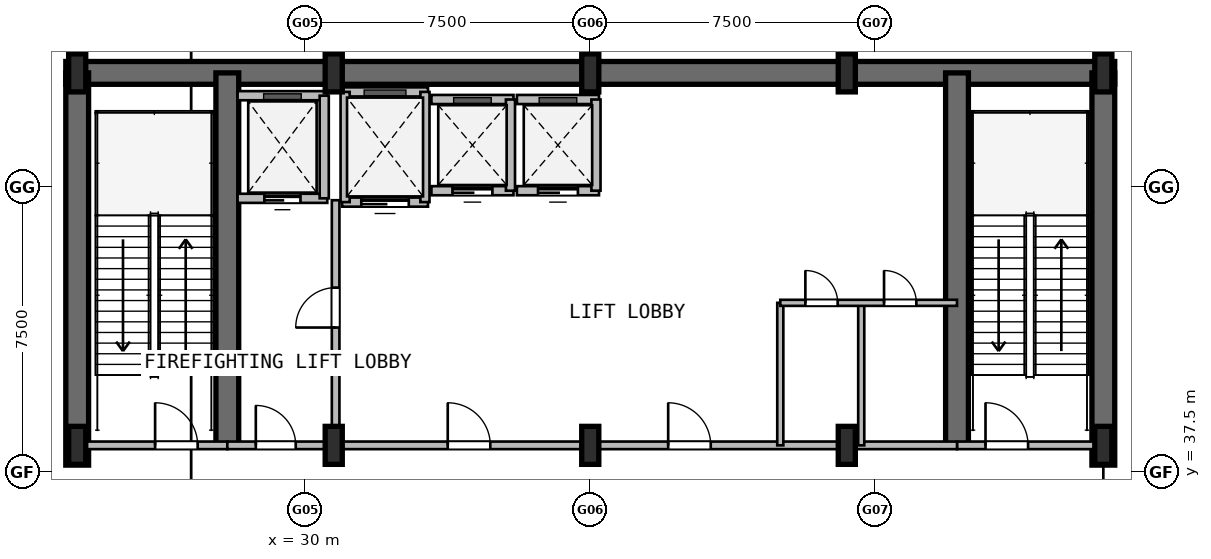
"""IFC4 building model, lengths in metres.
Left out: names, types, materials, properties, quantities, classifications, styles, units other than length and angle.
Written with IfcOpenShell. Run it as: python <this file> out.ifc"""

import sys

from ifc_helpers import new_model, si_unit, direction, frame, frame_2d, origin, origin_2d, place, context, subcontext, project, spatial, rectangle, i_section, extrude, element, fill, save


model = new_model("IFC4")
c1 = context("Model", 3, precision=1e-05, world=origin(), true_north=direction((0.0, 1.0)))
c2 = subcontext(c1, "Body", "Model", "MODEL_VIEW")
j1 = project(units=[si_unit("LENGTHUNIT", "METRE"), si_unit("PLANEANGLEUNIT", "RADIAN")], contexts=[c1])
p1 = place(None, origin())
s1 = spatial("IfcSite", under=j1, at=p1, CompositionType="ELEMENT")
p2 = place(p1, origin())
s2 = spatial("IfcBuilding", under=s1, at=p2, CompositionType="ELEMENT")
p3 = place(p2, frame((0.0, 0.0, -10.8)))
s3 = spatial("IfcBuildingStorey", under=s2, at=p3, CompositionType="ELEMENT", Elevation=-10.8)
p4 = place(p3, frame((23.7, 48.0, 0.0), z_axis=(0.0, 0.0, 1.0), x_axis=(1.0, 0.0, 0.0)))
e1 = element("IfcWall", 1, at=p4, inside=s3, PredefinedType="SHEAR", context=c2, shape_type="SweptSolid", body=[
    extrude(rectangle(XDim=27.6, YDim=0.6, at=frame_2d((13.8, 0.0))), origin(), (0.0, 0.0, 1.0), 5.4),
])
for number, where, z_axis, x_axis in (
    (2, (24.0, 37.68, 0.0), (0.0, 0.0, 1.0), (0.0, 1.0, 0.0)),
    (3, (51.0, 37.68, 0.0), (0.0, 0.0, 1.0), (0.0, 1.0, 0.0)),
):
    element("IfcWall", number, at=place(p3, frame(where, z_axis=z_axis, x_axis=x_axis)), inside=s3, PredefinedType="SHEAR", context=c2, shape_type="SweptSolid", body=[
        extrude(rectangle(XDim=10.32, YDim=0.6, at=frame_2d((5.16, 0.0))), origin(), (0.0, 0.0, 1.0), 5.4),
    ])
for number, where, z_axis, x_axis in (
    (4, (27.95, 38.2, 0.0), (0.0, 0.0, 1.0), (0.0, 1.0, 0.0)),
    (5, (47.15, 38.2, 0.0), (0.0, 0.0, 1.0), (0.0, 1.0, 0.0)),
):
    element("IfcWall", number, at=place(p3, frame(where, z_axis=z_axis, x_axis=x_axis)), inside=s3, PredefinedType="SHEAR", context=c2, shape_type="SweptSolid", body=[
        extrude(rectangle(XDim=9.8, YDim=0.6, at=frame_2d((4.9, 0.0))), origin(), (0.0, 0.0, 1.0), 5.4),
    ])
for number, where, z_axis, x_axis in (
    (6, (24.0, 38.2, 0.0), (0.0, 0.0, 1.0), (1.0, 0.0, 0.0)),
    (7, (24.0, 48.0, 0.0), (0.0, 0.0, 1.0), (1.0, 0.0, 0.0)),
    (8, (30.75, 38.2, 0.0), (0.0, 0.0, 1.0), (1.0, 0.0, 0.0)),
    (9, (30.75, 48.0, 0.0), (0.0, 0.0, 1.0), (1.0, 0.0, 0.0)),
    (10, (37.5, 38.2, 0.0), (0.0, 0.0, 1.0), (1.0, 0.0, 0.0)),
    (11, (37.5, 48.0, 0.0), (0.0, 0.0, 1.0), (1.0, 0.0, 0.0)),
    (12, (44.25, 38.2, 0.0), (0.0, 0.0, 1.0), (1.0, 0.0, 0.0)),
    (13, (44.25, 48.0, 0.0), (0.0, 0.0, 1.0), (1.0, 0.0, 0.0)),
    (14, (51.0, 38.2, 0.0), (0.0, 0.0, 1.0), (1.0, 0.0, 0.0)),
    (15, (51.0, 48.0, 0.0), (0.0, 0.0, 1.0), (1.0, 0.0, 0.0)),
):
    element("IfcColumn", number, at=place(p3, frame(where, z_axis=z_axis, x_axis=x_axis)), inside=s3, PredefinedType="COLUMN", context=c2, shape_type="SweptSolid", body=[
        extrude(i_section(OverallWidth=0.45, OverallDepth=1.0, WebThickness=0.022, FlangeThickness=0.04, at=origin_2d()), origin(), (0.0, 0.0, 1.0), 5.4),
    ])
p5 = place(p3, frame((24.0, 38.2, 0.0), z_axis=(0.0, 0.0, 1.0), x_axis=(1.0, 0.0, 0.0)))
e16 = element("IfcWall", 16, at=p5, inside=s3, PredefinedType="PARTITIONING", context=c2, shape_type="SweptSolid", body=[
    extrude(rectangle(XDim=3.95, YDim=0.2, at=frame_2d((1.975, 0.0))), origin(), (0.0, 0.0, 1.0), 4.28),
])
p6 = place(p5, frame((2.05, 0.0, 0.0)))
e17 = element("IfcOpeningElement", 17, at=p6, cuts=e16, PredefinedType="OPENING", context=c2, shape_type="SweptSolid", body=[
    extrude(rectangle(XDim=1.12, YDim=2.1, at=frame_2d((0.56, 1.05))), frame((0.0, 0.11, 0.0), z_axis=(0.0, -1.0, 0.0), x_axis=(1.0, 0.0, 0.0)), (0.0, 0.0, 1.0), 0.22),
])
p7 = place(p3, frame((47.15, 38.2, 0.0), z_axis=(0.0, 0.0, 1.0), x_axis=(1.0, 0.0, 0.0)))
e18 = element("IfcWall", 18, at=p7, inside=s3, PredefinedType="PARTITIONING", context=c2, shape_type="SweptSolid", body=[
    extrude(rectangle(XDim=3.85, YDim=0.2, at=frame_2d((1.925, 0.0))), origin(), (0.0, 0.0, 1.0), 4.28),
])
p8 = place(p7, frame((0.75, 0.0, 0.0)))
e19 = element("IfcOpeningElement", 19, at=p8, cuts=e18, PredefinedType="OPENING", context=c2, shape_type="SweptSolid", body=[
    extrude(rectangle(XDim=1.12, YDim=2.1, at=frame_2d((0.56, 1.05))), frame((0.0, 0.11, 0.0), z_axis=(0.0, -1.0, 0.0), x_axis=(1.0, 0.0, 0.0)), (0.0, 0.0, 1.0), 0.22),
])
p9 = place(p3, frame((30.8, 38.2, 0.0), z_axis=(0.0, 0.0, 1.0), x_axis=(0.0, 1.0, 0.0)))
e20 = element("IfcWall", 20, at=p9, inside=s3, PredefinedType="PARTITIONING", context=c2, shape_type="SweptSolid", body=[
    extrude(rectangle(XDim=6.45, YDim=0.2, at=frame_2d((3.225, 0.0))), origin(), (0.0, 0.0, 1.0), 4.28),
])
p10 = place(p9, frame((3.1, 0.0, 0.0)))
e21 = element("IfcOpeningElement", 21, at=p10, cuts=e20, PredefinedType="OPENING", context=c2, shape_type="SweptSolid", body=[
    extrude(rectangle(XDim=1.05, YDim=2.1, at=frame_2d((0.525, 1.05))), frame((0.0, 0.11, 0.0), z_axis=(0.0, -1.0, 0.0), x_axis=(1.0, 0.0, 0.0)), (0.0, 0.0, 1.0), 0.22),
])
p11 = place(p3, frame((27.95, 38.2, 0.0), z_axis=(0.0, 0.0, 1.0), x_axis=(1.0, 0.0, 0.0)))
e22 = element("IfcWall", 22, at=p11, inside=s3, PredefinedType="PARTITIONING", context=c2, shape_type="SweptSolid", body=[
    extrude(rectangle(XDim=2.85, YDim=0.2, at=frame_2d((1.425, 0.0))), origin(), (0.0, 0.0, 1.0), 4.28),
])
p12 = place(p11, frame((0.75, 0.0, 0.0)))
e23 = element("IfcOpeningElement", 23, at=p12, cuts=e22, PredefinedType="OPENING", context=c2, shape_type="SweptSolid", body=[
    extrude(rectangle(XDim=1.05, YDim=2.1, at=frame_2d((0.525, 1.05))), frame((0.0, 0.11, 0.0), z_axis=(0.0, -1.0, 0.0), x_axis=(1.0, 0.0, 0.0)), (0.0, 0.0, 1.0), 0.22),
])
p13 = place(p3, frame((30.8, 38.2, 0.0), z_axis=(0.0, 0.0, 1.0), x_axis=(1.0, 0.0, 0.0)))
e24 = element("IfcWall", 24, at=p13, inside=s3, PredefinedType="PARTITIONING", context=c2, shape_type="SweptSolid", body=[
    extrude(rectangle(XDim=16.35, YDim=0.2, at=frame_2d((8.175, 0.0))), origin(), (0.0, 0.0, 1.0), 4.28),
])
p14 = place(p13, frame((2.95, 0.0, 0.0)))
e25 = element("IfcOpeningElement", 25, at=p14, cuts=e24, PredefinedType="OPENING", context=c2, shape_type="SweptSolid", body=[
    extrude(rectangle(XDim=1.12, YDim=2.1, at=frame_2d((0.56, 1.05))), frame((0.0, 0.11, 0.0), z_axis=(0.0, -1.0, 0.0), x_axis=(1.0, 0.0, 0.0)), (0.0, 0.0, 1.0), 0.22),
])
p15 = place(p13, frame((8.75, 0.0, 0.0)))
e26 = element("IfcOpeningElement", 26, at=p15, cuts=e24, PredefinedType="OPENING", context=c2, shape_type="SweptSolid", body=[
    extrude(rectangle(XDim=1.12, YDim=2.1, at=frame_2d((0.56, 1.05))), frame((0.0, 0.11, 0.0), z_axis=(0.0, -1.0, 0.0), x_axis=(1.0, 0.0, 0.0)), (0.0, 0.0, 1.0), 0.22),
])
p16 = place(p3, frame((28.22, 44.7, 0.0), z_axis=(0.0, 0.0, 1.0), x_axis=(1.0, 0.0, 0.0)))
e27 = element("IfcWall", 27, at=p16, inside=s3, PredefinedType="PARTITIONING", context=c2, shape_type="SweptSolid", body=[
    extrude(rectangle(XDim=2.36, YDim=0.24, at=frame_2d((1.18, 0.0))), origin(), (0.0, 0.0, 1.0), 5.08),
])
p17 = place(p16, frame((0.705, 0.0, 0.0)))
e28 = element("IfcOpeningElement", 28, at=p17, cuts=e27, PredefinedType="OPENING", context=c2, shape_type="SweptSolid", body=[
    extrude(rectangle(XDim=0.95, YDim=2.15, at=frame_2d((0.475, 1.075))), frame((0.0, 0.13, 0.0), z_axis=(0.0, -1.0, 0.0), x_axis=(1.0, 0.0, 0.0)), (0.0, 0.0, 1.0), 0.26),
])
p18 = place(p3, frame((28.22, 47.4, 0.0), z_axis=(0.0, 0.0, 1.0), x_axis=(1.0, 0.0, 0.0)))
e29 = element("IfcWall", 29, at=p18, inside=s3, PredefinedType="PARTITIONING", context=c2, shape_type="SweptSolid", body=[
    extrude(rectangle(XDim=2.36, YDim=0.24, at=frame_2d((1.18, 0.0))), origin(), (0.0, 0.0, 1.0), 5.08),
])
p19 = place(p3, frame((30.5, 44.7, 0.0), z_axis=(0.0, 0.0, 1.0), x_axis=(0.0, 1.0, 0.0)))
e30 = element("IfcWall", 30, at=p19, inside=s3, PredefinedType="PARTITIONING", context=c2, shape_type="SweptSolid", body=[
    extrude(rectangle(XDim=2.7, YDim=0.24, at=frame_2d((1.35, 0.0))), origin(), (0.0, 0.0, 1.0), 4.28),
])
p20 = place(p3, frame((30.97, 44.6, 0.0), z_axis=(0.0, 0.0, 1.0), x_axis=(1.0, 0.0, 0.0)))
e31 = element("IfcWall", 31, at=p20, inside=s3, PredefinedType="PARTITIONING", context=c2, shape_type="SweptSolid", body=[
    extrude(rectangle(XDim=2.26, YDim=0.24, at=frame_2d((1.13, 0.0))), origin(), (0.0, 0.0, 1.0), 5.08),
])
p21 = place(p20, frame((0.505, 0.0, 0.0)))
e32 = element("IfcOpeningElement", 32, at=p21, cuts=e31, PredefinedType="OPENING", context=c2, shape_type="SweptSolid", body=[
    extrude(rectangle(XDim=1.25, YDim=2.2, at=frame_2d((0.625, 1.1))), frame((0.0, 0.13, 0.0), z_axis=(0.0, -1.0, 0.0), x_axis=(1.0, 0.0, 0.0)), (0.0, 0.0, 1.0), 0.26),
])
p22 = place(p3, frame((30.97, 47.5, 0.0), z_axis=(0.0, 0.0, 1.0), x_axis=(1.0, 0.0, 0.0)))
e33 = element("IfcWall", 33, at=p22, inside=s3, PredefinedType="PARTITIONING", context=c2, shape_type="SweptSolid", body=[
    extrude(rectangle(XDim=2.26, YDim=0.24, at=frame_2d((1.13, 0.0))), origin(), (0.0, 0.0, 1.0), 5.08),
])
p23 = place(p3, frame((31.05, 44.6, 0.0), z_axis=(0.0, 0.0, 1.0), x_axis=(0.0, 1.0, 0.0)))
e34 = element("IfcWall", 34, at=p23, inside=s3, PredefinedType="PARTITIONING", context=c2, shape_type="SweptSolid", body=[
    extrude(rectangle(XDim=2.9, YDim=0.24, at=frame_2d((1.45, 0.0))), origin(), (0.0, 0.0, 1.0), 4.28),
])
p24 = place(p3, frame((33.15, 44.6, 0.0), z_axis=(0.0, 0.0, 1.0), x_axis=(0.0, 1.0, 0.0)))
e35 = element("IfcWall", 35, at=p24, inside=s3, PredefinedType="PARTITIONING", context=c2, shape_type="SweptSolid", body=[
    extrude(rectangle(XDim=2.9, YDim=0.24, at=frame_2d((1.45, 0.0))), origin(), (0.0, 0.0, 1.0), 5.08),
])
p25 = place(p3, frame((33.32, 44.9, 0.0), z_axis=(0.0, 0.0, 1.0), x_axis=(1.0, 0.0, 0.0)))
e36 = element("IfcWall", 36, at=p25, inside=s3, PredefinedType="PARTITIONING", context=c2, shape_type="SweptSolid", body=[
    extrude(rectangle(XDim=2.16, YDim=0.24, at=frame_2d((1.08, 0.0))), origin(), (0.0, 0.0, 1.0), 5.08),
])
p26 = place(p25, frame((0.555, 0.0, 0.0)))
e37 = element("IfcOpeningElement", 37, at=p26, cuts=e36, PredefinedType="OPENING", context=c2, shape_type="SweptSolid", body=[
    extrude(rectangle(XDim=1.05, YDim=2.15, at=frame_2d((0.525, 1.075))), frame((0.0, 0.13, 0.0), z_axis=(0.0, -1.0, 0.0), x_axis=(1.0, 0.0, 0.0)), (0.0, 0.0, 1.0), 0.26),
])
p27 = place(p3, frame((33.32, 47.3, 0.0), z_axis=(0.0, 0.0, 1.0), x_axis=(1.0, 0.0, 0.0)))
e38 = element("IfcWall", 38, at=p27, inside=s3, PredefinedType="PARTITIONING", context=c2, shape_type="SweptSolid", body=[
    extrude(rectangle(XDim=2.16, YDim=0.24, at=frame_2d((1.08, 0.0))), origin(), (0.0, 0.0, 1.0), 5.08),
])
p28 = place(p3, frame((35.4, 44.9, 0.0), z_axis=(0.0, 0.0, 1.0), x_axis=(0.0, 1.0, 0.0)))
e39 = element("IfcWall", 39, at=p28, inside=s3, PredefinedType="PARTITIONING", context=c2, shape_type="SweptSolid", body=[
    extrude(rectangle(XDim=2.4, YDim=0.24, at=frame_2d((1.2, 0.0))), origin(), (0.0, 0.0, 1.0), 5.08),
])
p29 = place(p3, frame((35.57, 44.9, 0.0), z_axis=(0.0, 0.0, 1.0), x_axis=(1.0, 0.0, 0.0)))
e40 = element("IfcWall", 40, at=p29, inside=s3, PredefinedType="PARTITIONING", context=c2, shape_type="SweptSolid", body=[
    extrude(rectangle(XDim=2.16, YDim=0.24, at=frame_2d((1.08, 0.0))), origin(), (0.0, 0.0, 1.0), 5.08),
])
p30 = place(p29, frame((0.555, 0.0, 0.0)))
e41 = element("IfcOpeningElement", 41, at=p30, cuts=e40, PredefinedType="OPENING", context=c2, shape_type="SweptSolid", body=[
    extrude(rectangle(XDim=1.05, YDim=2.15, at=frame_2d((0.525, 1.075))), frame((0.0, 0.13, 0.0), z_axis=(0.0, -1.0, 0.0), x_axis=(1.0, 0.0, 0.0)), (0.0, 0.0, 1.0), 0.26),
])
p31 = place(p3, frame((35.57, 47.3, 0.0), z_axis=(0.0, 0.0, 1.0), x_axis=(1.0, 0.0, 0.0)))
e42 = element("IfcWall", 42, at=p31, inside=s3, PredefinedType="PARTITIONING", context=c2, shape_type="SweptSolid", body=[
    extrude(rectangle(XDim=2.16, YDim=0.24, at=frame_2d((1.08, 0.0))), origin(), (0.0, 0.0, 1.0), 5.08),
])
p32 = place(p3, frame((37.65, 44.9, 0.0), z_axis=(0.0, 0.0, 1.0), x_axis=(0.0, 1.0, 0.0)))
e43 = element("IfcWall", 43, at=p32, inside=s3, PredefinedType="PARTITIONING", context=c2, shape_type="SweptSolid", body=[
    extrude(rectangle(XDim=2.4, YDim=0.24, at=frame_2d((1.2, 0.0))), origin(), (0.0, 0.0, 1.0), 5.08),
])
for number, where, z_axis, x_axis in (
    (44, (42.5, 38.2, 0.0), (0.0, 0.0, 1.0), (0.0, 1.0, 0.0)),
    (45, (44.63, 38.2, 0.0), (0.0, 0.0, 1.0), (0.0, 1.0, 0.0)),
):
    element("IfcWall", number, at=place(p3, frame(where, z_axis=z_axis, x_axis=x_axis)), inside=s3, PredefinedType="PARTITIONING", context=c2, shape_type="SweptSolid", body=[
        extrude(rectangle(XDim=3.75, YDim=0.16, at=frame_2d((1.875, 0.0))), origin(), (0.0, 0.0, 1.0), 5.08),
    ])
p33 = place(p3, frame((42.5, 41.95, 0.0), z_axis=(0.0, 0.0, 1.0), x_axis=(1.0, 0.0, 0.0)))
e46 = element("IfcWall", 46, at=p33, inside=s3, PredefinedType="PARTITIONING", context=c2, shape_type="SweptSolid", body=[
    extrude(rectangle(XDim=4.65, YDim=0.16, at=frame_2d((2.325, 0.0))), origin(), (0.0, 0.0, 1.0), 5.08),
])
p34 = place(p33, frame((0.66, 0.0, 0.0)))
e47 = element("IfcOpeningElement", 47, at=p34, cuts=e46, PredefinedType="OPENING", context=c2, shape_type="SweptSolid", body=[
    extrude(rectangle(XDim=0.85, YDim=2.05, at=frame_2d((0.425, 1.025))), frame((0.0, 0.09, 0.0), z_axis=(0.0, -1.0, 0.0), x_axis=(1.0, 0.0, 0.0)), (0.0, 0.0, 1.0), 0.18),
])
p35 = place(p33, frame((2.73, 0.0, 0.0)))
e48 = element("IfcOpeningElement", 48, at=p35, cuts=e46, PredefinedType="OPENING", context=c2, shape_type="SweptSolid", body=[
    extrude(rectangle(XDim=0.85, YDim=2.05, at=frame_2d((0.425, 1.025))), frame((0.0, 0.09, 0.0), z_axis=(0.0, -1.0, 0.0), x_axis=(1.0, 0.0, 0.0)), (0.0, 0.0, 1.0), 0.18),
])
p36 = place(p6, origin())
e49 = element("IfcDoor", 49, at=p36, inside=s3, OperationType="SINGLE_SWING_LEFT", PredefinedType="DOOR", context=c2, shape_type="SweptSolid", body=[
    extrude(rectangle(XDim=1.12, YDim=2.1, at=frame_2d((0.56, 1.05))), frame((0.0, 0.025, 0.0), z_axis=(0.0, -1.0, 0.0), x_axis=(1.0, 0.0, 0.0)), (0.0, 0.0, 1.0), 0.05),
])
fill(e17, e49)
p37 = place(p8, origin())
e50 = element("IfcDoor", 50, at=p37, inside=s3, OperationType="SINGLE_SWING_RIGHT", PredefinedType="DOOR", context=c2, shape_type="SweptSolid", body=[
    extrude(rectangle(XDim=1.12, YDim=2.1, at=frame_2d((0.56, 1.05))), frame((0.0, 0.025, 0.0), z_axis=(0.0, -1.0, 0.0), x_axis=(1.0, 0.0, 0.0)), (0.0, 0.0, 1.0), 0.05),
])
fill(e19, e50)
p38 = place(p10, origin())
e51 = element("IfcDoor", 51, at=p38, inside=s3, OperationType="SINGLE_SWING_LEFT", PredefinedType="DOOR", context=c2, shape_type="SweptSolid", body=[
    extrude(rectangle(XDim=1.05, YDim=2.1, at=frame_2d((0.525, 1.05))), frame((0.0, 0.025, 0.0), z_axis=(0.0, -1.0, 0.0), x_axis=(1.0, 0.0, 0.0)), (0.0, 0.0, 1.0), 0.05),
])
fill(e21, e51)
p39 = place(p12, origin())
e52 = element("IfcDoor", 52, at=p39, inside=s3, OperationType="SINGLE_SWING_RIGHT", PredefinedType="DOOR", context=c2, shape_type="SweptSolid", body=[
    extrude(rectangle(XDim=1.05, YDim=2.1, at=frame_2d((0.525, 1.05))), frame((0.0, 0.025, 0.0), z_axis=(0.0, -1.0, 0.0), x_axis=(1.0, 0.0, 0.0)), (0.0, 0.0, 1.0), 0.05),
])
fill(e23, e52)
p40 = place(p14, origin())
e53 = element("IfcDoor", 53, at=p40, inside=s3, OperationType="SINGLE_SWING_LEFT", PredefinedType="DOOR", context=c2, shape_type="SweptSolid", body=[
    extrude(rectangle(XDim=1.12, YDim=2.1, at=frame_2d((0.56, 1.05))), frame((0.0, 0.025, 0.0), z_axis=(0.0, -1.0, 0.0), x_axis=(1.0, 0.0, 0.0)), (0.0, 0.0, 1.0), 0.05),
])
fill(e25, e53)
p41 = place(p15, origin())
e54 = element("IfcDoor", 54, at=p41, inside=s3, OperationType="SINGLE_SWING_RIGHT", PredefinedType="DOOR", context=c2, shape_type="SweptSolid", body=[
    extrude(rectangle(XDim=1.12, YDim=2.1, at=frame_2d((0.56, 1.05))), frame((0.0, 0.025, 0.0), z_axis=(0.0, -1.0, 0.0), x_axis=(1.0, 0.0, 0.0)), (0.0, 0.0, 1.0), 0.05),
])
fill(e26, e54)
p42 = place(p17, origin())
e55 = element("IfcDoor", 55, at=p42, inside=s3, OperationType="SLIDING_TO_LEFT", PredefinedType="DOOR", context=c2, shape_type="SweptSolid", body=[
    extrude(rectangle(XDim=0.95, YDim=2.15, at=frame_2d((0.475, 1.075))), frame((0.0, 0.025, 0.0), z_axis=(0.0, -1.0, 0.0), x_axis=(1.0, 0.0, 0.0)), (0.0, 0.0, 1.0), 0.05),
])
fill(e28, e55)
p43 = place(p21, origin())
e56 = element("IfcDoor", 56, at=p43, inside=s3, OperationType="SLIDING_TO_LEFT", PredefinedType="DOOR", context=c2, shape_type="SweptSolid", body=[
    extrude(rectangle(XDim=1.25, YDim=2.2, at=frame_2d((0.625, 1.1))), frame((0.0, 0.025, 0.0), z_axis=(0.0, -1.0, 0.0), x_axis=(1.0, 0.0, 0.0)), (0.0, 0.0, 1.0), 0.05),
])
fill(e32, e56)
p44 = place(p26, origin())
e57 = element("IfcDoor", 57, at=p44, inside=s3, OperationType="SLIDING_TO_LEFT", PredefinedType="DOOR", context=c2, shape_type="SweptSolid", body=[
    extrude(rectangle(XDim=1.05, YDim=2.15, at=frame_2d((0.525, 1.075))), frame((0.0, 0.025, 0.0), z_axis=(0.0, -1.0, 0.0), x_axis=(1.0, 0.0, 0.0)), (0.0, 0.0, 1.0), 0.05),
])
fill(e37, e57)
p45 = place(p30, origin())
e58 = element("IfcDoor", 58, at=p45, inside=s3, OperationType="SLIDING_TO_LEFT", PredefinedType="DOOR", context=c2, shape_type="SweptSolid", body=[
    extrude(rectangle(XDim=1.05, YDim=2.15, at=frame_2d((0.525, 1.075))), frame((0.0, 0.025, 0.0), z_axis=(0.0, -1.0, 0.0), x_axis=(1.0, 0.0, 0.0)), (0.0, 0.0, 1.0), 0.05),
])
fill(e41, e58)
p46 = place(p34, origin())
e59 = element("IfcDoor", 59, at=p46, inside=s3, OperationType="SINGLE_SWING_LEFT", PredefinedType="DOOR", context=c2, shape_type="SweptSolid", body=[
    extrude(rectangle(XDim=0.85, YDim=2.05, at=frame_2d((0.425, 1.025))), frame((0.0, 0.025, 0.0), z_axis=(0.0, -1.0, 0.0), x_axis=(1.0, 0.0, 0.0)), (0.0, 0.0, 1.0), 0.05),
])
fill(e47, e59)
p47 = place(p35, origin())
e60 = element("IfcDoor", 60, at=p47, inside=s3, OperationType="SINGLE_SWING_RIGHT", PredefinedType="DOOR", context=c2, shape_type="SweptSolid", body=[
    extrude(rectangle(XDim=0.85, YDim=2.05, at=frame_2d((0.425, 1.025))), frame((0.0, 0.025, 0.0), z_axis=(0.0, -1.0, 0.0), x_axis=(1.0, 0.0, 0.0)), (0.0, 0.0, 1.0), 0.05),
])
fill(e48, e60)
save(model, sys.argv[1])
